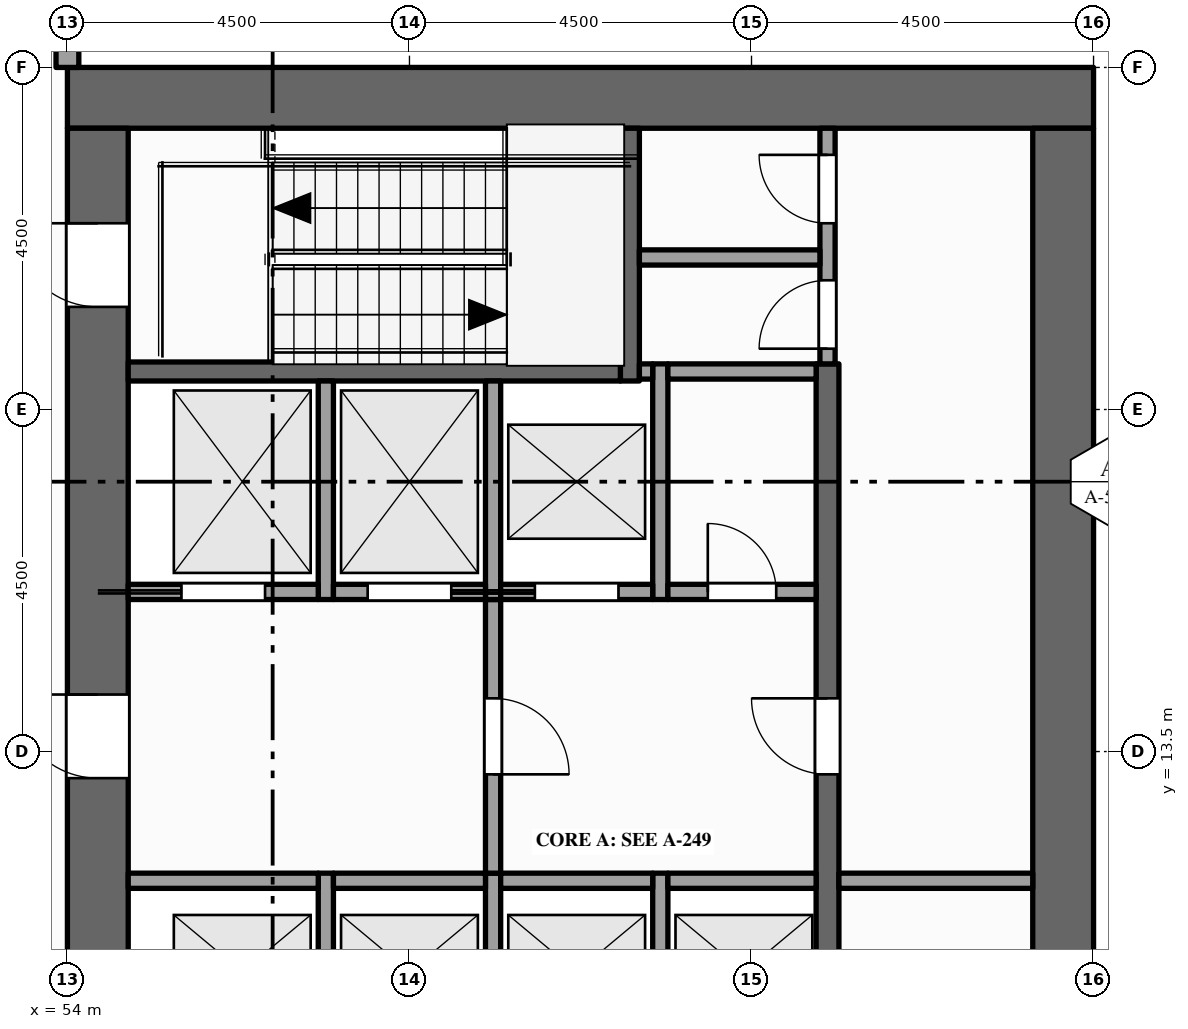
"""IFC4 building model, lengths in metres.
Left out: names, types, materials, properties, quantities, classifications, styles, units other than length and angle.
Written with IfcOpenShell. Run it as: python <this file> out.ifc"""

import sys

from ifc_helpers import new_model, si_unit, direction, frame, frame_2d, origin, place, context, subcontext, project, spatial, rectangle, extrude, element, fill, save


model = new_model("IFC4")
c1 = context("Model", 3, precision=1e-05, world=origin(), true_north=direction((0.0, 1.0)))
c2 = subcontext(c1, "Body", "Model", "MODEL_VIEW")
j1 = project(units=[si_unit("LENGTHUNIT", "METRE"), si_unit("PLANEANGLEUNIT", "RADIAN")], contexts=[c1])
p1 = place(None, origin())
s1 = spatial("IfcSite", under=j1, at=p1, CompositionType="ELEMENT")
p2 = place(p1, origin())
s2 = spatial("IfcBuilding", under=s1, at=p2, CompositionType="ELEMENT")
p3 = place(p2, frame((0.0, 0.0, 281.0)))
s3 = spatial("IfcBuildingStorey", under=s2, at=p3, CompositionType="ELEMENT", Elevation=281.0)
p4 = place(p3, frame((54.0, 22.1, -0.15), z_axis=(0.0, 0.0, 1.0), x_axis=(1.0, 0.0, 0.0)))
e1 = element("IfcWall", 1, at=p4, inside=s3, PredefinedType="SHEAR", context=c2, shape_type="SweptSolid", body=[
    extrude(rectangle(XDim=13.5, YDim=0.8, at=frame_2d((6.75, 0.0))), origin(), (0.0, 0.0, 1.0), 4.0),
])
p5 = place(p3, frame((54.4, 0.8, -0.15), z_axis=(0.0, 0.0, 1.0), x_axis=(0.0, 1.0, 0.0)))
e2 = element("IfcWall", 2, at=p5, inside=s3, PredefinedType="SHEAR", context=c2, shape_type="SweptSolid", body=[
    extrude(rectangle(XDim=20.9, YDim=0.8, at=frame_2d((10.45, 0.0))), origin(), (0.0, 0.0, 1.0), 4.0),
])
p6 = place(p5, frame((6.3, 0.0, 0.15)))
e3 = element("IfcOpeningElement", 3, at=p6, cuts=e2, PredefinedType="OPENING", context=c2, shape_type="SweptSolid", body=[
    extrude(rectangle(XDim=1.8, YDim=2.1, at=frame_2d((0.9, 1.05))), frame((0.0, 0.41, 0.0), z_axis=(0.0, -1.0, 0.0), x_axis=(1.0, 0.0, 0.0)), (0.0, 0.0, 1.0), 0.82),
])
p7 = place(p5, frame((12.35, 0.0, 0.15)))
e4 = element("IfcOpeningElement", 4, at=p7, cuts=e2, PredefinedType="OPENING", context=c2, shape_type="SweptSolid", body=[
    extrude(rectangle(XDim=1.1, YDim=2.1, at=frame_2d((0.55, 1.05))), frame((0.0, 0.41, 0.0), z_axis=(0.0, -1.0, 0.0), x_axis=(1.0, 0.0, 0.0)), (0.0, 0.0, 1.0), 0.82),
])
p8 = place(p5, frame((1.35, 0.0, 0.15)))
e5 = element("IfcOpeningElement", 5, at=p8, cuts=e2, PredefinedType="OPENING", context=c2, shape_type="SweptSolid", body=[
    extrude(rectangle(XDim=1.1, YDim=2.1, at=frame_2d((0.55, 1.05))), frame((0.0, 0.41, 0.0), z_axis=(0.0, -1.0, 0.0), x_axis=(1.0, 0.0, 0.0)), (0.0, 0.0, 1.0), 0.82),
])
p9 = place(p5, frame((18.55, 0.0, 0.15)))
e6 = element("IfcOpeningElement", 6, at=p9, cuts=e2, PredefinedType="OPENING", context=c2, shape_type="SweptSolid", body=[
    extrude(rectangle(XDim=1.1, YDim=2.1, at=frame_2d((0.55, 1.05))), frame((0.0, 0.41, 0.0), z_axis=(0.0, -1.0, 0.0), x_axis=(1.0, 0.0, 0.0)), (0.0, 0.0, 1.0), 0.82),
])
p10 = place(p3, frame((67.1, 0.8, -0.15), z_axis=(0.0, 0.0, 1.0), x_axis=(0.0, 1.0, 0.0)))
e7 = element("IfcWall", 7, at=p10, inside=s3, PredefinedType="SHEAR", context=c2, shape_type="SweptSolid", body=[
    extrude(rectangle(XDim=20.9, YDim=0.8, at=frame_2d((10.45, 0.0))), origin(), (0.0, 0.0, 1.0), 4.0),
])
p11 = place(p3, frame((54.0, 22.5, 0.0), z_axis=(0.0, 0.0, 1.0), x_axis=(0.0, 1.0, 0.0)))
e8 = element("IfcWall", 8, at=p11, inside=s3, PredefinedType="STANDARD", context=c2, shape_type="SweptSolid", body=[
    extrude(rectangle(XDim=1.175, YDim=0.3, at=frame_2d((0.587, 0.0))), origin(), (0.0, 0.0, 1.0), 3.162),
])
p12 = place(p3, frame((57.4, 9.3, 0.0), z_axis=(0.0, 0.0, 1.0), x_axis=(0.0, 1.0, 0.0)))
e9 = element("IfcWall", 9, at=p12, inside=s3, PredefinedType="SOLIDWALL", context=c2, shape_type="SweptSolid", body=[
    extrude(rectangle(XDim=2.6, YDim=0.2, at=frame_2d((1.3, 0.0))), origin(), (0.0, 0.0, 1.0), 3.85),
])
p13 = place(p3, frame((57.4, 15.5, 0.0), z_axis=(0.0, 0.0, 1.0), x_axis=(0.0, 1.0, 0.0)))
e10 = element("IfcWall", 10, at=p13, inside=s3, PredefinedType="SOLIDWALL", context=c2, shape_type="SweptSolid", body=[
    extrude(rectangle(XDim=2.875, YDim=0.2, at=frame_2d((1.438, 0.0))), origin(), (0.0, 0.0, 1.0), 3.85),
])
p14 = place(p3, frame((59.6, 9.3, 0.0), z_axis=(0.0, 0.0, 1.0), x_axis=(0.0, 1.0, 0.0)))
e11 = element("IfcWall", 11, at=p14, inside=s3, PredefinedType="SOLIDWALL", context=c2, shape_type="SweptSolid", body=[
    extrude(rectangle(XDim=2.6, YDim=0.2, at=frame_2d((1.3, 0.0))), origin(), (0.0, 0.0, 1.0), 3.85),
])
p15 = place(p3, frame((59.6, 11.9, 0.0), z_axis=(0.0, 0.0, 1.0), x_axis=(0.0, 1.0, 0.0)))
e12 = element("IfcWall", 12, at=p15, inside=s3, PredefinedType="PARTITIONING", context=c2, shape_type="SweptSolid", body=[
    extrude(rectangle(XDim=3.6, YDim=0.2, at=frame_2d((1.8, 0.0))), origin(), (0.0, 0.0, 1.0), 3.85),
])
p16 = place(p15, frame((1.3, 0.0, 0.0)))
e13 = element("IfcOpeningElement", 13, at=p16, cuts=e12, PredefinedType="OPENING", context=c2, shape_type="SweptSolid", body=[
    extrude(rectangle(XDim=1.0, YDim=2.1, at=frame_2d((0.5, 1.05))), frame((0.0, 0.11, 0.0), z_axis=(0.0, -1.0, 0.0), x_axis=(1.0, 0.0, 0.0)), (0.0, 0.0, 1.0), 0.22),
])
p17 = place(p3, frame((59.6, 15.5, 0.0), z_axis=(0.0, 0.0, 1.0), x_axis=(0.0, 1.0, 0.0)))
e14 = element("IfcWall", 14, at=p17, inside=s3, PredefinedType="SOLIDWALL", context=c2, shape_type="SweptSolid", body=[
    extrude(rectangle(XDim=2.875, YDim=0.2, at=frame_2d((1.438, 0.0))), origin(), (0.0, 0.0, 1.0), 3.85),
])
p18 = place(p3, frame((61.4, 18.375, 0.0), z_axis=(0.0, 0.0, 1.0), x_axis=(0.0, 1.0, 0.0)))
e15 = element("IfcWall", 15, at=p18, inside=s3, PredefinedType="SHEAR", context=c2, shape_type="SweptSolid", body=[
    extrude(rectangle(XDim=3.325, YDim=0.25, at=frame_2d((1.663, 0.0))), origin(), (0.0, 0.0, 1.0), 3.85),
])
p19 = place(p3, frame((61.8, 9.3, 0.0), z_axis=(0.0, 0.0, 1.0), x_axis=(0.0, 1.0, 0.0)))
e16 = element("IfcWall", 16, at=p19, inside=s3, PredefinedType="SOLIDWALL", context=c2, shape_type="SweptSolid", body=[
    extrude(rectangle(XDim=2.6, YDim=0.2, at=frame_2d((1.3, 0.0))), origin(), (0.0, 0.0, 1.0), 3.85),
])
p20 = place(p3, frame((61.8, 15.5, 0.0), z_axis=(0.0, 0.0, 1.0), x_axis=(0.0, 1.0, 0.0)))
e17 = element("IfcWall", 17, at=p20, inside=s3, PredefinedType="SOLIDWALL", context=c2, shape_type="SweptSolid", body=[
    extrude(rectangle(XDim=3.1, YDim=0.2, at=frame_2d((1.55, 0.0))), origin(), (0.0, 0.0, 1.0), 3.85),
])
p21 = place(p3, frame((64.0, 4.1, 0.0), z_axis=(0.0, 0.0, 1.0), x_axis=(0.0, 1.0, 0.0)))
e18 = element("IfcWall", 18, at=p21, inside=s3, PredefinedType="SHEAR", context=c2, shape_type="SweptSolid", body=[
    extrude(rectangle(XDim=14.5, YDim=0.3, at=frame_2d((7.25, 0.0))), origin(), (0.0, 0.0, 1.0), 3.85),
])
p22 = place(p21, frame((3.4, 0.0, 0.0)))
e19 = element("IfcOpeningElement", 19, at=p22, cuts=e18, PredefinedType="OPENING", context=c2, shape_type="SweptSolid", body=[
    extrude(rectangle(XDim=1.0, YDim=2.1, at=frame_2d((0.5, 1.05))), frame((0.0, 0.16, 0.0), z_axis=(0.0, -1.0, 0.0), x_axis=(1.0, 0.0, 0.0)), (0.0, 0.0, 1.0), 0.32),
])
p23 = place(p21, frame((9.1, 0.0, 0.0)))
e20 = element("IfcOpeningElement", 20, at=p23, cuts=e18, PredefinedType="OPENING", context=c2, shape_type="SweptSolid", body=[
    extrude(rectangle(XDim=1.0, YDim=2.1, at=frame_2d((0.5, 1.05))), frame((0.0, 0.16, 0.0), z_axis=(0.0, -1.0, 0.0), x_axis=(1.0, 0.0, 0.0)), (0.0, 0.0, 1.0), 0.32),
])
p24 = place(p3, frame((64.0, 18.6, 0.0), z_axis=(0.0, 0.0, 1.0), x_axis=(0.0, 1.0, 0.0)))
e21 = element("IfcWall", 21, at=p24, inside=s3, PredefinedType="PARTITIONING", context=c2, shape_type="SweptSolid", body=[
    extrude(rectangle(XDim=3.1, YDim=0.2, at=frame_2d((1.55, 0.0))), origin(), (0.0, 0.0, 1.0), 3.85),
])
p25 = place(p24, frame((0.2, 0.0, 0.0)))
e22 = element("IfcOpeningElement", 22, at=p25, cuts=e21, PredefinedType="OPENING", context=c2, shape_type="SweptSolid", body=[
    extrude(rectangle(XDim=0.9, YDim=2.1, at=frame_2d((0.45, 1.05))), frame((0.0, 0.11, 0.0), z_axis=(0.0, -1.0, 0.0), x_axis=(1.0, 0.0, 0.0)), (0.0, 0.0, 1.0), 0.22),
])
p26 = place(p24, frame((1.85, 0.0, 0.0)))
e23 = element("IfcOpeningElement", 23, at=p26, cuts=e21, PredefinedType="OPENING", context=c2, shape_type="SweptSolid", body=[
    extrude(rectangle(XDim=0.9, YDim=2.1, at=frame_2d((0.45, 1.05))), frame((0.0, 0.11, 0.0), z_axis=(0.0, -1.0, 0.0), x_axis=(1.0, 0.0, 0.0)), (0.0, 0.0, 1.0), 0.22),
])
p27 = place(p3, frame((54.8, 11.8, 0.0), z_axis=(0.0, 0.0, 1.0), x_axis=(1.0, 0.0, 0.0)))
e24 = element("IfcWall", 24, at=p27, inside=s3, PredefinedType="SOLIDWALL", context=c2, shape_type="SweptSolid", body=[
    extrude(rectangle(XDim=2.5, YDim=0.2, at=frame_2d((1.25, 0.0))), origin(), (0.0, 0.0, 1.0), 3.85),
])
for number, where, z_axis, x_axis in (
    (25, (57.5, 11.8, 0.0), (0.0, 0.0, 1.0), (1.0, 0.0, 0.0)),
    (26, (59.7, 11.8, 0.0), (0.0, 0.0, 1.0), (1.0, 0.0, 0.0)),
):
    element("IfcWall", number, at=place(p3, frame(where, z_axis=z_axis, x_axis=x_axis)), inside=s3, PredefinedType="SOLIDWALL", context=c2, shape_type="SweptSolid", body=[
        extrude(rectangle(XDim=2.0, YDim=0.2, at=frame_2d((1.0, 0.0))), origin(), (0.0, 0.0, 1.0), 3.85),
    ])
p28 = place(p3, frame((61.9, 11.8, 0.0), z_axis=(0.0, 0.0, 1.0), x_axis=(1.0, 0.0, 0.0)))
e27 = element("IfcWall", 27, at=p28, inside=s3, PredefinedType="SOLIDWALL", context=c2, shape_type="SweptSolid", body=[
    extrude(rectangle(XDim=1.95, YDim=0.2, at=frame_2d((0.975, 0.0))), origin(), (0.0, 0.0, 1.0), 3.85),
])
p29 = place(p3, frame((64.15, 11.8, 0.0), z_axis=(0.0, 0.0, 1.0), x_axis=(1.0, 0.0, 0.0)))
e28 = element("IfcWall", 28, at=p29, inside=s3, PredefinedType="PARTITIONING", context=c2, shape_type="SweptSolid", body=[
    extrude(rectangle(XDim=2.55, YDim=0.2, at=frame_2d((1.275, 0.0))), origin(), (0.0, 0.0, 1.0), 3.85),
])
p30 = place(p3, frame((54.8, 15.6, 0.0), z_axis=(0.0, 0.0, 1.0), x_axis=(1.0, 0.0, 0.0)))
e29 = element("IfcWall", 29, at=p30, inside=s3, PredefinedType="SOLIDWALL", context=c2, shape_type="SweptSolid", body=[
    extrude(rectangle(XDim=2.5, YDim=0.2, at=frame_2d((1.25, 0.0))), origin(), (0.0, 0.0, 1.0), 3.85),
])
p31 = place(p30, frame((0.7, 0.0, 0.012)))
e30 = element("IfcOpeningElement", 30, at=p31, cuts=e29, PredefinedType="OPENING", context=c2, shape_type="SweptSolid", body=[
    extrude(rectangle(XDim=1.1, YDim=2.1, at=frame_2d((0.55, 1.05))), frame((0.0, 0.11, 0.0), z_axis=(0.0, -1.0, 0.0), x_axis=(1.0, 0.0, 0.0)), (0.0, 0.0, 1.0), 0.22),
])
p32 = place(p3, frame((57.5, 15.6, 0.0), z_axis=(0.0, 0.0, 1.0), x_axis=(1.0, 0.0, 0.0)))
e31 = element("IfcWall", 31, at=p32, inside=s3, PredefinedType="SOLIDWALL", context=c2, shape_type="SweptSolid", body=[
    extrude(rectangle(XDim=2.0, YDim=0.2, at=frame_2d((1.0, 0.0))), origin(), (0.0, 0.0, 1.0), 3.85),
])
p33 = place(p32, frame((0.45, 0.0, 0.012)))
e32 = element("IfcOpeningElement", 32, at=p33, cuts=e31, PredefinedType="OPENING", context=c2, shape_type="SweptSolid", body=[
    extrude(rectangle(XDim=1.1, YDim=2.1, at=frame_2d((0.55, 1.05))), frame((0.0, 0.11, 0.0), z_axis=(0.0, -1.0, 0.0), x_axis=(1.0, 0.0, 0.0)), (0.0, 0.0, 1.0), 0.22),
])
p34 = place(p3, frame((59.7, 15.6, 0.0), z_axis=(0.0, 0.0, 1.0), x_axis=(1.0, 0.0, 0.0)))
e33 = element("IfcWall", 33, at=p34, inside=s3, PredefinedType="SOLIDWALL", context=c2, shape_type="SweptSolid", body=[
    extrude(rectangle(XDim=2.0, YDim=0.2, at=frame_2d((1.0, 0.0))), origin(), (0.0, 0.0, 1.0), 3.85),
])
p35 = place(p34, frame((0.45, 0.0, 0.012)))
e34 = element("IfcOpeningElement", 34, at=p35, cuts=e33, PredefinedType="OPENING", context=c2, shape_type="SweptSolid", body=[
    extrude(rectangle(XDim=1.1, YDim=2.1, at=frame_2d((0.55, 1.05))), frame((0.0, 0.11, 0.0), z_axis=(0.0, -1.0, 0.0), x_axis=(1.0, 0.0, 0.0)), (0.0, 0.0, 1.0), 0.22),
])
p36 = place(p3, frame((61.9, 15.6, 0.0), z_axis=(0.0, 0.0, 1.0), x_axis=(1.0, 0.0, 0.0)))
e35 = element("IfcWall", 35, at=p36, inside=s3, PredefinedType="PARTITIONING", context=c2, shape_type="SweptSolid", body=[
    extrude(rectangle(XDim=1.95, YDim=0.2, at=frame_2d((0.975, 0.0))), origin(), (0.0, 0.0, 1.0), 3.85),
])
p37 = place(p36, frame((0.525, 0.0, 0.0)))
e36 = element("IfcOpeningElement", 36, at=p37, cuts=e35, PredefinedType="OPENING", context=c2, shape_type="SweptSolid", body=[
    extrude(rectangle(XDim=0.9, YDim=2.1, at=frame_2d((0.45, 1.05))), frame((0.0, 0.11, 0.0), z_axis=(0.0, -1.0, 0.0), x_axis=(1.0, 0.0, 0.0)), (0.0, 0.0, 1.0), 0.22),
])
p38 = place(p3, frame((54.8, 18.5, 0.0), z_axis=(0.0, 0.0, 1.0), x_axis=(1.0, 0.0, 0.0)))
e37 = element("IfcWall", 37, at=p38, inside=s3, PredefinedType="SHEAR", context=c2, shape_type="SweptSolid", body=[
    extrude(rectangle(XDim=6.475, YDim=0.25, at=frame_2d((3.237, 0.0))), origin(), (0.0, 0.0, 1.0), 3.85),
])
p39 = place(p3, frame((61.525, 18.5, 0.0), z_axis=(0.0, 0.0, 1.0), x_axis=(1.0, 0.0, 0.0)))
e38 = element("IfcWall", 38, at=p39, inside=s3, PredefinedType="SOLIDWALL", context=c2, shape_type="SweptSolid", body=[
    extrude(rectangle(XDim=0.175, YDim=0.2, at=frame_2d((0.087, 0.0))), origin(), (0.0, 0.0, 1.0), 3.85),
])
p40 = place(p3, frame((61.9, 18.5, 0.0), z_axis=(0.0, 0.0, 1.0), x_axis=(1.0, 0.0, 0.0)))
e39 = element("IfcWall", 39, at=p40, inside=s3, PredefinedType="PARTITIONING", context=c2, shape_type="SweptSolid", body=[
    extrude(rectangle(XDim=1.95, YDim=0.2, at=frame_2d((0.975, 0.0))), origin(), (0.0, 0.0, 1.0), 3.85),
])
p41 = place(p3, frame((61.525, 20.0, 0.0), z_axis=(0.0, 0.0, 1.0), x_axis=(1.0, 0.0, 0.0)))
e40 = element("IfcWall", 40, at=p41, inside=s3, PredefinedType="PARTITIONING", context=c2, shape_type="SweptSolid", body=[
    extrude(rectangle(XDim=2.375, YDim=0.2, at=frame_2d((1.188, 0.0))), origin(), (0.0, 0.0, 1.0), 3.85),
])
p42 = place(p31, origin())
e41 = element("IfcDoor", 41, at=p42, inside=s3, OperationType="SLIDING_TO_LEFT", PredefinedType="DOOR", context=c2, shape_type="SweptSolid", body=[
    extrude(rectangle(XDim=1.1, YDim=2.1, at=frame_2d((0.55, 1.05))), frame((0.0, 0.025, 0.0), z_axis=(0.0, -1.0, 0.0), x_axis=(1.0, 0.0, 0.0)), (0.0, 0.0, 1.0), 0.05),
])
fill(e30, e41)
p43 = place(p33, origin())
e42 = element("IfcDoor", 42, at=p43, inside=s3, OperationType="SLIDING_TO_RIGHT", PredefinedType="DOOR", context=c2, shape_type="SweptSolid", body=[
    extrude(rectangle(XDim=1.1, YDim=2.1, at=frame_2d((0.55, 1.05))), frame((0.0, 0.025, 0.0), z_axis=(0.0, -1.0, 0.0), x_axis=(1.0, 0.0, 0.0)), (0.0, 0.0, 1.0), 0.05),
])
fill(e32, e42)
p44 = place(p35, origin())
e43 = element("IfcDoor", 43, at=p44, inside=s3, OperationType="SLIDING_TO_LEFT", PredefinedType="DOOR", context=c2, shape_type="SweptSolid", body=[
    extrude(rectangle(XDim=1.1, YDim=2.1, at=frame_2d((0.55, 1.05))), frame((0.0, 0.025, 0.0), z_axis=(0.0, -1.0, 0.0), x_axis=(1.0, 0.0, 0.0)), (0.0, 0.0, 1.0), 0.05),
])
fill(e34, e43)
p45 = place(p7, origin())
e44 = element("IfcDoor", 44, at=p45, inside=s3, OperationType="SINGLE_SWING_RIGHT", PredefinedType="DOOR", context=c2, shape_type="SweptSolid", body=[
    extrude(rectangle(XDim=1.1, YDim=2.1, at=frame_2d((0.55, 1.05))), frame((0.0, 0.025, 0.0), z_axis=(0.0, -1.0, 0.0), x_axis=(1.0, 0.0, 0.0)), (0.0, 0.0, 1.0), 0.05),
])
fill(e4, e44)
p46 = place(p16, origin())
e45 = element("IfcDoor", 45, at=p46, inside=s3, OperationType="SINGLE_SWING_LEFT", PredefinedType="DOOR", context=c2, shape_type="SweptSolid", body=[
    extrude(rectangle(XDim=1.0, YDim=2.1, at=frame_2d((0.5, 1.05))), frame((0.0, 0.025, 0.0), z_axis=(0.0, -1.0, 0.0), x_axis=(1.0, 0.0, 0.0)), (0.0, 0.0, 1.0), 0.05),
])
fill(e13, e45)
p47 = place(p23, origin())
e46 = element("IfcDoor", 46, at=p47, inside=s3, OperationType="SINGLE_SWING_RIGHT", PredefinedType="DOOR", context=c2, shape_type="SweptSolid", body=[
    extrude(rectangle(XDim=1.0, YDim=2.1, at=frame_2d((0.5, 1.05))), frame((0.0, 0.025, 0.0), z_axis=(0.0, -1.0, 0.0), x_axis=(1.0, 0.0, 0.0)), (0.0, 0.0, 1.0), 0.05),
])
fill(e20, e46)
p48 = place(p9, origin())
e47 = element("IfcDoor", 47, at=p48, inside=s3, OperationType="SINGLE_SWING_RIGHT", PredefinedType="DOOR", context=c2, shape_type="SweptSolid", body=[
    extrude(rectangle(XDim=1.1, YDim=2.1, at=frame_2d((0.55, 1.05))), frame((0.0, 0.025, 0.0), z_axis=(0.0, -1.0, 0.0), x_axis=(1.0, 0.0, 0.0)), (0.0, 0.0, 1.0), 0.05),
])
fill(e6, e47)
p49 = place(p25, origin())
e48 = element("IfcDoor", 48, at=p49, inside=s3, OperationType="SINGLE_SWING_LEFT", PredefinedType="DOOR", context=c2, shape_type="SweptSolid", body=[
    extrude(rectangle(XDim=0.9, YDim=2.1, at=frame_2d((0.45, 1.05))), frame((0.0, 0.025, 0.0), z_axis=(0.0, -1.0, 0.0), x_axis=(1.0, 0.0, 0.0)), (0.0, 0.0, 1.0), 0.05),
])
fill(e22, e48)
p50 = place(p26, origin())
e49 = element("IfcDoor", 49, at=p50, inside=s3, OperationType="SINGLE_SWING_RIGHT", PredefinedType="DOOR", context=c2, shape_type="SweptSolid", body=[
    extrude(rectangle(XDim=0.9, YDim=2.1, at=frame_2d((0.45, 1.05))), frame((0.0, 0.025, 0.0), z_axis=(0.0, -1.0, 0.0), x_axis=(1.0, 0.0, 0.0)), (0.0, 0.0, 1.0), 0.05),
])
fill(e23, e49)
p51 = place(p37, origin())
e50 = element("IfcDoor", 50, at=p51, inside=s3, OperationType="SINGLE_SWING_LEFT", PredefinedType="DOOR", context=c2, shape_type="SweptSolid", body=[
    extrude(rectangle(XDim=0.9, YDim=2.1, at=frame_2d((0.45, 1.05))), frame((0.0, 0.025, 0.0), z_axis=(0.0, -1.0, 0.0), x_axis=(1.0, 0.0, 0.0)), (0.0, 0.0, 1.0), 0.05),
])
fill(e36, e50)
save(model, sys.argv[1])
